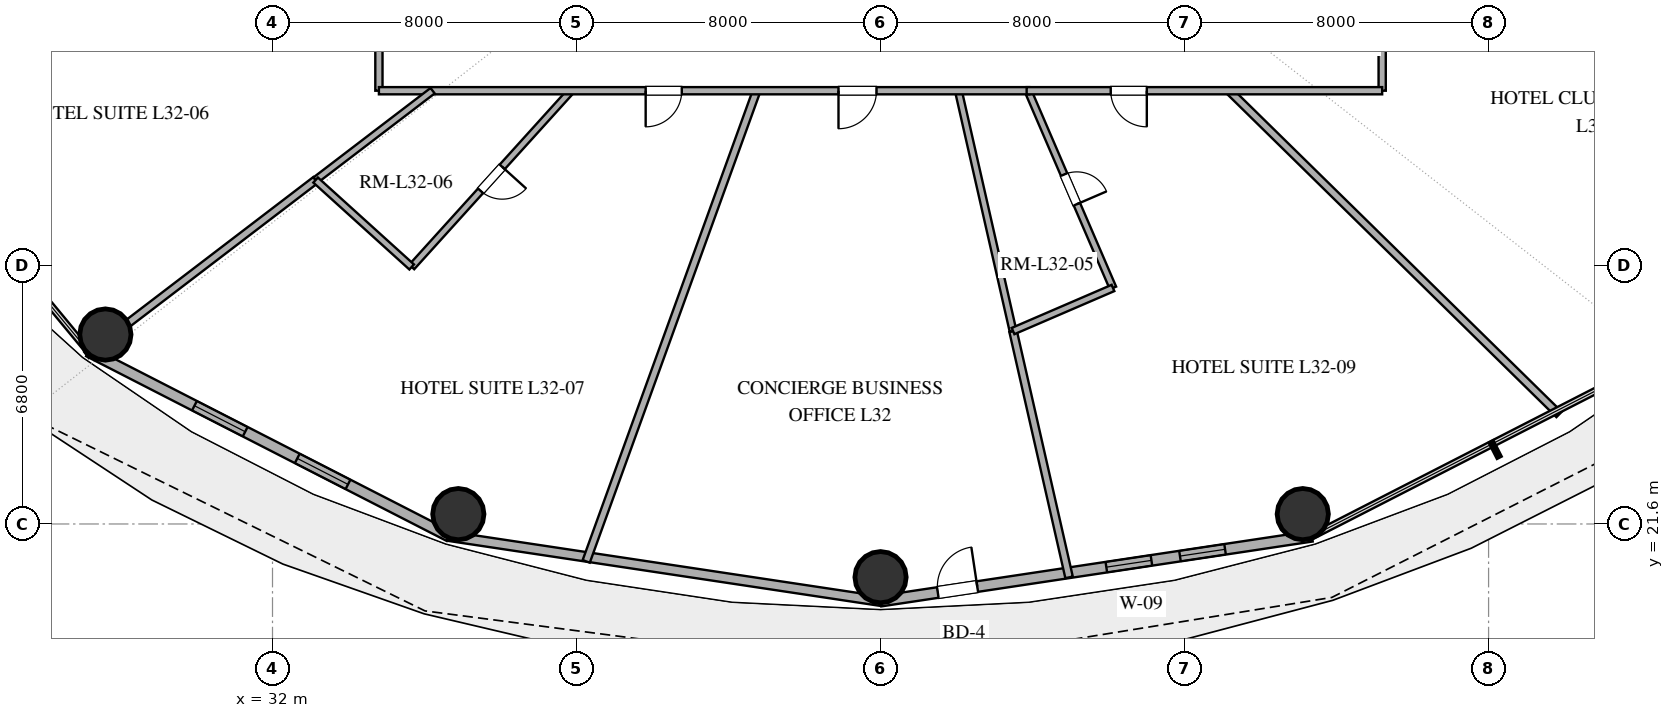
"""IFC4 building model, lengths in metres.
Left out: names, types, materials, properties, quantities, classifications, styles, units other than length and angle.
Written with IfcOpenShell. Run it as: python <this file> out.ifc"""

import sys

from ifc_helpers import new_model, si_unit, direction, frame, frame_2d, origin, origin_2d, place, context, subcontext, project, spatial, rectangle, hollow_circle, extrude, element, fill, save


model = new_model("IFC4")
c1 = context("Model", 3, precision=1e-05, world=origin(), true_north=direction((0.0, 1.0)))
c2 = subcontext(c1, "Body", "Model", "MODEL_VIEW")
j1 = project(units=[si_unit("LENGTHUNIT", "METRE"), si_unit("PLANEANGLEUNIT", "RADIAN")], contexts=[c1])
p1 = place(None, origin())
s1 = spatial("IfcSite", under=j1, at=p1, CompositionType="ELEMENT")
p2 = place(p1, origin())
s2 = spatial("IfcBuilding", under=s1, at=p2, CompositionType="ELEMENT")
p3 = place(p2, frame((0.0, 0.0, 127.2)))
s3 = spatial("IfcBuildingStorey", under=s2, at=p3, CompositionType="ELEMENT", Elevation=127.2)
for number, where, z_axis, x_axis in (
    (1, (27.602, 26.585, 0.0), (0.0, 0.0, 1.0), (1.0, 0.0, 0.0)),
    (2, (36.89, 21.859, 0.0), (0.0, 0.0, 1.0), (1.0, 0.0, 0.0)),
    (3, (48.0, 20.2, 0.0), (0.0, 0.0, 1.0), (1.0, 0.0, 0.0)),
    (4, (59.11, 21.859, 0.0), (0.0, 0.0, 1.0), (1.0, 0.0, 0.0)),
):
    element("IfcColumn", number, at=place(p3, frame(where, z_axis=z_axis, x_axis=x_axis)), inside=s3, PredefinedType="COLUMN", context=c2, shape_type="SweptSolid", body=[
        extrude(hollow_circle(Radius=0.675, WallThickness=0.036, at=origin_2d()), origin(), (0.0, 0.0, 1.0), 3.38),
    ])
p4 = place(p3, frame((27.16, 26.14, 0.0), z_axis=(0.0, 0.0, 1.0), x_axis=(0.889959505023, -0.45603955905, 0.0)))
e5 = element("IfcWall", 5, at=p4, inside=s3, PredefinedType="SOLIDWALL", context=c2, shape_type="SweptSolid", body=[
    extrude(rectangle(XDim=10.662, YDim=0.28, at=frame_2d((5.331, 0.0))), origin(), (0.0, 0.0, 1.0), 3.38),
])
p5 = place(p4, frame((3.131, 0.0, 0.85)))
e6 = element("IfcOpeningElement", 6, at=p5, cuts=e5, PredefinedType="OPENING", context=c2, shape_type="SweptSolid", body=[
    extrude(rectangle(XDim=1.5, YDim=2.0, at=frame_2d((0.75, 1.0))), frame((0.0, 0.15, 0.0), z_axis=(0.0, -1.0, 0.0), x_axis=(1.0, 0.0, 0.0)), (0.0, 0.0, 1.0), 0.3),
])
p6 = place(p4, frame((6.171, 0.0, 0.85)))
e7 = element("IfcOpeningElement", 7, at=p6, cuts=e5, PredefinedType="OPENING", context=c2, shape_type="SweptSolid", body=[
    extrude(rectangle(XDim=1.5, YDim=2.0, at=frame_2d((0.75, 1.0))), frame((0.0, 0.15, 0.0), z_axis=(0.0, -1.0, 0.0), x_axis=(1.0, 0.0, 0.0)), (0.0, 0.0, 1.0), 0.3),
])
p7 = place(p3, frame((36.649, 21.277, 0.0), z_axis=(0.0, 0.0, 1.0), x_axis=(0.988877774656, -0.148730450117, 0.0)))
e8 = element("IfcWall", 8, at=p7, inside=s3, PredefinedType="SOLIDWALL", context=c2, shape_type="SweptSolid", body=[
    extrude(rectangle(XDim=11.479, YDim=0.25, at=frame_2d((5.74, 0.0))), origin(), (0.0, 0.0, 1.0), 3.38),
])
p8 = place(p3, frame((48.0, 19.57, 0.0), z_axis=(0.0, 0.0, 1.0), x_axis=(0.988877774656, 0.148730450117, 0.0)))
e9 = element("IfcWall", 9, at=p8, inside=s3, PredefinedType="SOLIDWALL", context=c2, shape_type="SweptSolid", body=[
    extrude(rectangle(XDim=11.479, YDim=0.28, at=frame_2d((5.74, 0.0))), origin(), (0.0, 0.0, 1.0), 3.38),
])
p9 = place(p8, frame((1.524, 0.0, 0.0)))
e10 = element("IfcOpeningElement", 10, at=p9, cuts=e9, PredefinedType="OPENING", context=c2, shape_type="SweptSolid", body=[
    extrude(rectangle(XDim=1.05, YDim=2.2, at=frame_2d((0.525, 1.1))), frame((0.0, 0.15, 0.0), z_axis=(0.0, -1.0, 0.0), x_axis=(1.0, 0.0, 0.0)), (0.0, 0.0, 1.0), 0.3),
])
p10 = place(p8, frame((6.008, 0.0, 0.85)))
e11 = element("IfcOpeningElement", 11, at=p10, cuts=e9, PredefinedType="OPENING", context=c2, shape_type="SweptSolid", body=[
    extrude(rectangle(XDim=1.2, YDim=1.8, at=frame_2d((0.6, 0.9))), frame((0.0, 0.15, 0.0), z_axis=(0.0, -1.0, 0.0), x_axis=(1.0, 0.0, 0.0)), (0.0, 0.0, 1.0), 0.3),
])
p11 = place(p8, frame((7.968, 0.0, 0.85)))
e12 = element("IfcOpeningElement", 12, at=p11, cuts=e9, PredefinedType="OPENING", context=c2, shape_type="SweptSolid", body=[
    extrude(rectangle(XDim=1.2, YDim=1.8, at=frame_2d((0.6, 0.9))), frame((0.0, 0.15, 0.0), z_axis=(0.0, -1.0, 0.0), x_axis=(1.0, 0.0, 0.0)), (0.0, 0.0, 1.0), 0.3),
])
p12 = place(p3, frame((44.74, 33.0, 0.0), z_axis=(0.0, 0.0, 1.0), x_axis=(-0.340540254487, -0.940229937342, 0.0)))
e13 = element("IfcWall", 13, at=p12, inside=s3, PredefinedType="PARTITIONING", context=c2, shape_type="SweptSolid", body=[
    extrude(rectangle(XDim=13.171, YDim=0.2, at=frame_2d((6.586, 0.0))), origin(), (0.0, 0.0, 1.0), 2.74),
])
p13 = place(p3, frame((57.173, 33.0, 0.0), z_axis=(0.0, 0.0, 1.0), x_axis=(0.713799293149, -0.700350318841, 0.0)))
e14 = element("IfcWall", 14, at=p13, inside=s3, PredefinedType="PARTITIONING", context=c2, shape_type="SweptSolid", body=[
    extrude(rectangle(XDim=12.163, YDim=0.2, at=frame_2d((6.081, 0.0))), origin(), (0.0, 0.0, 1.0), 2.74),
])
p14 = place(p3, frame((27.105, 26.046, 0.0), z_axis=(0.0, 0.0, 1.0), x_axis=(0.794798861724, 0.606872943376, 0.0)))
e15 = element("IfcWall", 15, at=p14, inside=s3, PredefinedType="PARTITIONING", context=c2, shape_type="SweptSolid", body=[
    extrude(rectangle(XDim=7.586, YDim=0.2, at=frame_2d((3.793, 0.0))), origin(), (0.0, 0.0, 1.0), 2.74),
])
p15 = place(p3, frame((52.961, 20.195, 0.0), z_axis=(0.0, 0.0, 1.0), x_axis=(-0.221859239387, 0.975078703438, 0.0)))
e16 = element("IfcWall", 16, at=p15, inside=s3, PredefinedType="PARTITIONING", context=c2, shape_type="SweptSolid", body=[
    extrude(rectangle(XDim=6.646, YDim=0.2, at=frame_2d((3.323, 0.0))), origin(), (0.0, 0.0, 1.0), 2.74),
])
p16 = place(p3, frame((51.487, 26.676, 0.0), z_axis=(0.0, 0.0, 1.0), x_axis=(-0.221842382837, 0.975082538648, 0.0)))
e17 = element("IfcWall", 17, at=p16, inside=s3, PredefinedType="PLUMBINGWALL", context=c2, shape_type="SweptSolid", body=[
    extrude(rectangle(XDim=6.485, YDim=0.18, at=frame_2d((3.243, 0.0))), origin(), (0.0, 0.0, 1.0), 2.74),
])
p17 = place(p3, frame((61.2, 41.749, 0.0), z_axis=(0.0, 0.0, 1.0), x_axis=(0.0, -1.0, 0.0)))
e18 = element("IfcWall", 18, at=p17, inside=s3, PredefinedType="PARTITIONING", context=c2, shape_type="SweptSolid", body=[
    extrude(rectangle(XDim=8.749, YDim=0.19, at=frame_2d((4.375, 0.0))), origin(), (0.0, 0.0, 1.0), 2.74),
])
p18 = place(p17, frame((5.103, 0.0, 0.0)))
e19 = element("IfcOpeningElement", 19, at=p18, cuts=e18, PredefinedType="OPENING", context=c2, shape_type="SweptSolid", body=[
    extrude(rectangle(XDim=1.0, YDim=2.2, at=frame_2d((0.5, 1.1))), frame((0.0, 0.105, 0.0), z_axis=(0.0, -1.0, 0.0), x_axis=(1.0, 0.0, 0.0)), (0.0, 0.0, 1.0), 0.21),
])
p19 = place(p3, frame((39.857, 33.0, 0.0), z_axis=(0.0, 0.0, 1.0), x_axis=(-0.670890833363, -0.741556127147, 0.0)))
e20 = element("IfcWall", 20, at=p19, inside=s3, PredefinedType="PLUMBINGWALL", context=c2, shape_type="SweptSolid", body=[
    extrude(rectangle(XDim=6.253, YDim=0.18, at=frame_2d((3.127, 0.0))), origin(), (0.0, 0.0, 1.0), 2.74),
])
p20 = place(p19, frame((2.702, 0.0, 0.0)))
e21 = element("IfcOpeningElement", 21, at=p20, cuts=e20, PredefinedType="OPENING", context=c2, shape_type="SweptSolid", body=[
    extrude(rectangle(XDim=0.85, YDim=2.1, at=frame_2d((0.425, 1.05))), frame((0.0, 0.1, 0.0), z_axis=(0.0, -1.0, 0.0), x_axis=(1.0, 0.0, 0.0)), (0.0, 0.0, 1.0), 0.2),
])
p21 = place(p3, frame((51.879, 33.0, 0.0), z_axis=(0.0, 0.0, 1.0), x_axis=(0.395831860018, -0.918323003412, 0.0)))
e22 = element("IfcWall", 22, at=p21, inside=s3, PredefinedType="PLUMBINGWALL", context=c2, shape_type="SweptSolid", body=[
    extrude(rectangle(XDim=5.652, YDim=0.18, at=frame_2d((2.826, 0.0))), origin(), (0.0, 0.0, 1.0), 2.74),
])
p22 = place(p21, frame((2.401, 0.0, 0.0)))
e23 = element("IfcOpeningElement", 23, at=p22, cuts=e22, PredefinedType="OPENING", context=c2, shape_type="SweptSolid", body=[
    extrude(rectangle(XDim=0.85, YDim=2.1, at=frame_2d((0.425, 1.05))), frame((0.0, 0.1, 0.0), z_axis=(0.0, -1.0, 0.0), x_axis=(1.0, 0.0, 0.0)), (0.0, 0.0, 1.0), 0.2),
])
p23 = place(p3, frame((34.8, 33.0, 0.0), z_axis=(0.0, 0.0, 1.0), x_axis=(0.0, 1.0, 0.0)))
e24 = element("IfcWall", 24, at=p23, inside=s3, PredefinedType="PARTITIONING", context=c2, shape_type="SweptSolid", body=[
    extrude(rectangle(XDim=5.463, YDim=0.19, at=frame_2d((2.731, 0.0))), origin(), (0.0, 0.0, 1.0), 2.74),
])
p24 = place(p23, frame((2.256, 0.0, 0.0)))
e25 = element("IfcOpeningElement", 25, at=p24, cuts=e24, PredefinedType="OPENING", context=c2, shape_type="SweptSolid", body=[
    extrude(rectangle(XDim=0.95, YDim=2.15, at=frame_2d((0.475, 1.075))), frame((0.0, 0.105, 0.0), z_axis=(0.0, -1.0, 0.0), x_axis=(1.0, 0.0, 0.0)), (0.0, 0.0, 1.0), 0.21),
])
p25 = place(p3, frame((51.914, 33.0, 0.0), z_axis=(0.0, 0.0, 1.0), x_axis=(-1.0, 0.0, 0.0)))
e26 = element("IfcWall", 26, at=p25, inside=s3, PredefinedType="PARTITIONING", context=c2, shape_type="SweptSolid", body=[
    extrude(rectangle(XDim=17.114, YDim=0.19, at=frame_2d((8.557, 0.0))), origin(), (0.0, 0.0, 1.0), 2.74),
])
p26 = place(p25, frame((4.021, 0.0, 0.0)))
e27 = element("IfcOpeningElement", 27, at=p26, cuts=e26, PredefinedType="OPENING", context=c2, shape_type="SweptSolid", body=[
    extrude(rectangle(XDim=1.0, YDim=2.2, at=frame_2d((0.5, 1.1))), frame((0.0, 0.105, 0.0), z_axis=(0.0, -1.0, 0.0), x_axis=(1.0, 0.0, 0.0)), (0.0, 0.0, 1.0), 0.21),
])
p27 = place(p25, frame((9.145, 0.0, 0.0)))
e28 = element("IfcOpeningElement", 28, at=p27, cuts=e26, PredefinedType="OPENING", context=c2, shape_type="SweptSolid", body=[
    extrude(rectangle(XDim=0.95, YDim=2.15, at=frame_2d((0.475, 1.075))), frame((0.0, 0.105, 0.0), z_axis=(0.0, -1.0, 0.0), x_axis=(1.0, 0.0, 0.0)), (0.0, 0.0, 1.0), 0.21),
])
p28 = place(p3, frame((61.2, 33.0, 0.0), z_axis=(0.0, 0.0, 1.0), x_axis=(-1.0, 0.0, 0.0)))
e29 = element("IfcWall", 29, at=p28, inside=s3, PredefinedType="PARTITIONING", context=c2, shape_type="SweptSolid", body=[
    extrude(rectangle(XDim=9.355, YDim=0.19, at=frame_2d((4.678, 0.0))), origin(), (0.0, 0.0, 1.0), 2.74),
])
p29 = place(p28, frame((6.193, 0.0, 0.0)))
e30 = element("IfcOpeningElement", 30, at=p29, cuts=e29, PredefinedType="OPENING", context=c2, shape_type="SweptSolid", body=[
    extrude(rectangle(XDim=0.95, YDim=2.15, at=frame_2d((0.475, 1.075))), frame((0.0, 0.105, 0.0), z_axis=(0.0, -1.0, 0.0), x_axis=(1.0, 0.0, 0.0)), (0.0, 0.0, 1.0), 0.21),
])
p30 = place(p3, frame((33.135, 30.649, 0.0), z_axis=(0.0, 0.0, 1.0), x_axis=(0.794788820215, 0.606886094141, 0.0)))
e31 = element("IfcWall", 31, at=p30, inside=s3, PredefinedType="PLUMBINGWALL", context=c2, shape_type="SweptSolid", body=[
    extrude(rectangle(XDim=3.873, YDim=0.18, at=frame_2d((1.937, 0.0))), origin(), (0.0, 0.0, 1.0), 2.74),
])
p31 = place(p3, frame((35.662, 28.363, 0.0), z_axis=(0.0, 0.0, 1.0), x_axis=(-0.741571413778, 0.670873936196, 0.0)))
e32 = element("IfcWall", 32, at=p31, inside=s3, PredefinedType="PLUMBINGWALL", context=c2, shape_type="SweptSolid", body=[
    extrude(rectangle(XDim=3.408, YDim=0.18, at=frame_2d((1.704, 0.0))), origin(), (0.0, 0.0, 1.0), 2.74),
])
p32 = place(p3, frame((54.116, 27.81, 0.0), z_axis=(0.0, 0.0, 1.0), x_axis=(-0.918296301957, -0.395893801178, 0.0)))
e33 = element("IfcWall", 33, at=p32, inside=s3, PredefinedType="PLUMBINGWALL", context=c2, shape_type="SweptSolid", body=[
    extrude(rectangle(XDim=2.864, YDim=0.18, at=frame_2d((1.432, 0.0))), origin(), (0.0, 0.0, 1.0), 2.74),
])
p33 = place(p5, origin())
e34 = element("IfcWindow", 34, at=p33, inside=s3, PartitioningType="SINGLE_PANEL", PredefinedType="WINDOW", context=c2, shape_type="SweptSolid", body=[
    extrude(rectangle(XDim=1.5, YDim=2.0, at=frame_2d((0.75, 1.0))), frame((0.0, 0.03, 0.0), z_axis=(0.0, -1.0, 0.0), x_axis=(1.0, 0.0, 0.0)), (0.0, 0.0, 1.0), 0.06),
])
fill(e6, e34)
p34 = place(p6, origin())
e35 = element("IfcWindow", 35, at=p34, inside=s3, PartitioningType="SINGLE_PANEL", PredefinedType="WINDOW", context=c2, shape_type="SweptSolid", body=[
    extrude(rectangle(XDim=1.5, YDim=2.0, at=frame_2d((0.75, 1.0))), frame((0.0, 0.03, 0.0), z_axis=(0.0, -1.0, 0.0), x_axis=(1.0, 0.0, 0.0)), (0.0, 0.0, 1.0), 0.06),
])
fill(e7, e35)
p35 = place(p9, origin())
e36 = element("IfcDoor", 36, at=p35, inside=s3, OperationType="SINGLE_SWING_RIGHT", PredefinedType="DOOR", context=c2, shape_type="SweptSolid", body=[
    extrude(rectangle(XDim=1.05, YDim=2.2, at=frame_2d((0.525, 1.1))), frame((0.0, 0.025, 0.0), z_axis=(0.0, -1.0, 0.0), x_axis=(1.0, 0.0, 0.0)), (0.0, 0.0, 1.0), 0.05),
])
fill(e10, e36)
p36 = place(p10, origin())
e37 = element("IfcWindow", 37, at=p36, inside=s3, PartitioningType="SINGLE_PANEL", PredefinedType="WINDOW", context=c2, shape_type="SweptSolid", body=[
    extrude(rectangle(XDim=1.2, YDim=1.8, at=frame_2d((0.6, 0.9))), frame((0.0, 0.03, 0.0), z_axis=(0.0, -1.0, 0.0), x_axis=(1.0, 0.0, 0.0)), (0.0, 0.0, 1.0), 0.06),
])
fill(e11, e37)
p37 = place(p11, origin())
e38 = element("IfcWindow", 38, at=p37, inside=s3, PartitioningType="SINGLE_PANEL", PredefinedType="WINDOW", context=c2, shape_type="SweptSolid", body=[
    extrude(rectangle(XDim=1.2, YDim=1.8, at=frame_2d((0.6, 0.9))), frame((0.0, 0.03, 0.0), z_axis=(0.0, -1.0, 0.0), x_axis=(1.0, 0.0, 0.0)), (0.0, 0.0, 1.0), 0.06),
])
fill(e12, e38)
p38 = place(p20, origin())
e39 = element("IfcDoor", 39, at=p38, inside=s3, OperationType="SINGLE_SWING_LEFT", PredefinedType="DOOR", context=c2, shape_type="SweptSolid", body=[
    extrude(rectangle(XDim=0.85, YDim=2.1, at=frame_2d((0.425, 1.05))), frame((0.0, 0.025, 0.0), z_axis=(0.0, -1.0, 0.0), x_axis=(1.0, 0.0, 0.0)), (0.0, 0.0, 1.0), 0.05),
])
fill(e21, e39)
p39 = place(p22, origin())
e40 = element("IfcDoor", 40, at=p39, inside=s3, OperationType="SINGLE_SWING_RIGHT", PredefinedType="DOOR", context=c2, shape_type="SweptSolid", body=[
    extrude(rectangle(XDim=0.85, YDim=2.1, at=frame_2d((0.425, 1.05))), frame((0.0, 0.025, 0.0), z_axis=(0.0, -1.0, 0.0), x_axis=(1.0, 0.0, 0.0)), (0.0, 0.0, 1.0), 0.05),
])
fill(e23, e40)
p40 = place(p26, origin())
e41 = element("IfcDoor", 41, at=p40, inside=s3, OperationType="SINGLE_SWING_RIGHT", PredefinedType="DOOR", context=c2, shape_type="SweptSolid", body=[
    extrude(rectangle(XDim=1.0, YDim=2.2, at=frame_2d((0.5, 1.1))), frame((0.0, 0.025, 0.0), z_axis=(0.0, -1.0, 0.0), x_axis=(1.0, 0.0, 0.0)), (0.0, 0.0, 1.0), 0.05),
])
fill(e27, e41)
p41 = place(p27, origin())
e42 = element("IfcDoor", 42, at=p41, inside=s3, OperationType="SINGLE_SWING_RIGHT", PredefinedType="DOOR", context=c2, shape_type="SweptSolid", body=[
    extrude(rectangle(XDim=0.95, YDim=2.15, at=frame_2d((0.475, 1.075))), frame((0.0, 0.025, 0.0), z_axis=(0.0, -1.0, 0.0), x_axis=(1.0, 0.0, 0.0)), (0.0, 0.0, 1.0), 0.05),
])
fill(e28, e42)
p42 = place(p29, origin())
e43 = element("IfcDoor", 43, at=p42, inside=s3, OperationType="SINGLE_SWING_LEFT", PredefinedType="DOOR", context=c2, shape_type="SweptSolid", body=[
    extrude(rectangle(XDim=0.95, YDim=2.15, at=frame_2d((0.475, 1.075))), frame((0.0, 0.025, 0.0), z_axis=(0.0, -1.0, 0.0), x_axis=(1.0, 0.0, 0.0)), (0.0, 0.0, 1.0), 0.05),
])
fill(e30, e43)
save(model, sys.argv[1])
